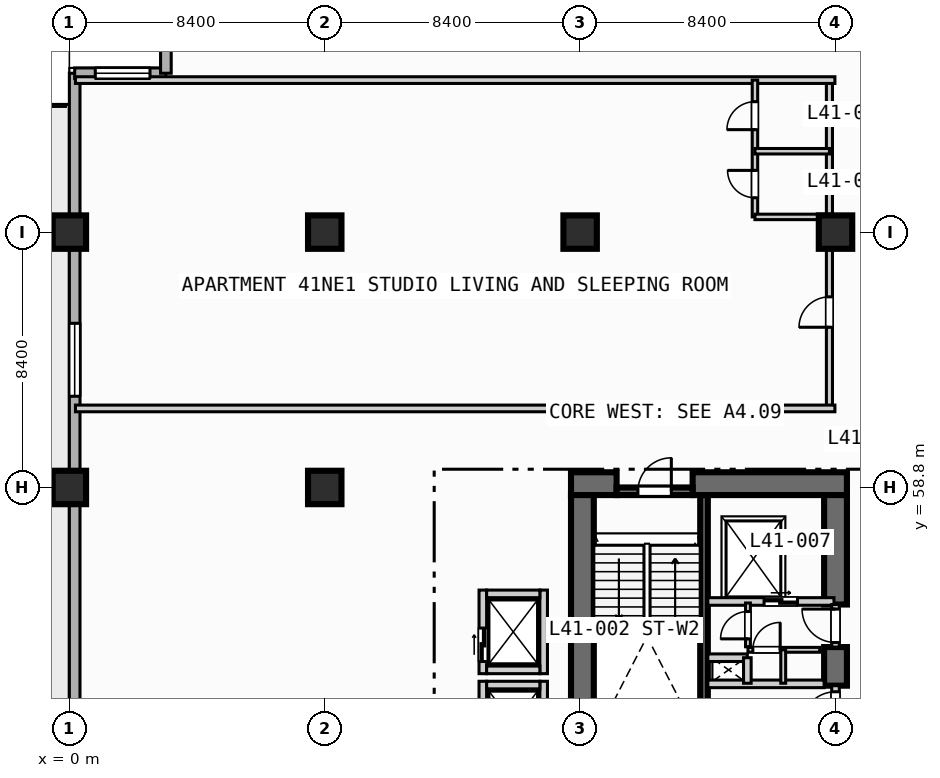
"""IFC4 building model, lengths in metres.
Left out: names, types, materials, properties, quantities, classifications, styles, units other than length and angle.
Written with IfcOpenShell. Run it as: python <this file> out.ifc"""

import sys

from ifc_helpers import new_model, si_unit, direction, frame, frame_2d, origin, origin_2d, place, context, subcontext, project, spatial, rectangle, extrude, element, fill, save


model = new_model("IFC4")
c1 = context("Model", 3, precision=1e-05, world=origin(), true_north=direction((0.0, 1.0)))
c2 = subcontext(c1, "Body", "Model", "MODEL_VIEW")
j1 = project(units=[si_unit("LENGTHUNIT", "METRE"), si_unit("PLANEANGLEUNIT", "RADIAN")], contexts=[c1])
p1 = place(None, origin())
s1 = spatial("IfcSite", under=j1, at=p1, CompositionType="ELEMENT")
p2 = place(p1, origin())
s2 = spatial("IfcBuilding", under=s1, at=p2, CompositionType="ELEMENT")
p3 = place(p2, frame((0.0, 0.0, 171.7)))
s3 = spatial("IfcBuildingStorey", under=s2, at=p3, CompositionType="ELEMENT", Elevation=171.7)
p4 = place(p3, frame((20.875, 50.5, 0.0), z_axis=(0.0, 0.0, 1.0), x_axis=(0.0, 1.0, 0.0)))
e1 = element("IfcWall", 1, at=p4, inside=s3, PredefinedType="SOLIDWALL", context=c2, shape_type="SweptSolid", body=[
    extrude(rectangle(XDim=8.05, YDim=0.25, at=frame_2d((4.025, 0.0))), origin(), (0.0, 0.0, 1.0), 3.47),
])
p5 = place(p3, frame((16.5, 58.925, 0.0), z_axis=(0.0, 0.0, 1.0), x_axis=(1.0, 0.0, 0.0)))
e2 = element("IfcWall", 2, at=p5, inside=s3, PredefinedType="SHEAR", context=c2, shape_type="SweptSolid", body=[
    extrude(rectangle(XDim=1.5, YDim=0.75, at=frame_2d((0.75, 0.0))), origin(), (0.0, 0.0, 1.0), 3.47),
])
p6 = place(p3, frame((20.5, 58.925, 0.0), z_axis=(0.0, 0.0, 1.0), x_axis=(1.0, 0.0, 0.0)))
e3 = element("IfcWall", 3, at=p6, inside=s3, PredefinedType="SHEAR", context=c2, shape_type="SweptSolid", body=[
    extrude(rectangle(XDim=5.075, YDim=0.75, at=frame_2d((2.538, 0.0))), origin(), (0.0, 0.0, 1.0), 3.47),
])
p7 = place(p3, frame((16.875, 42.2, 0.0), z_axis=(0.0, 0.0, 1.0), x_axis=(0.0, 1.0, 0.0)))
e4 = element("IfcWall", 4, at=p7, inside=s3, PredefinedType="SHEAR", context=c2, shape_type="SweptSolid", body=[
    extrude(rectangle(XDim=16.35, YDim=0.75, at=frame_2d((8.175, 0.0))), origin(), (0.0, 0.0, 1.0), 3.47),
])
p8 = place(p3, frame((25.2, 52.28, 0.0), z_axis=(0.0, 0.0, 1.0), x_axis=(0.0, 1.0, 0.0)))
e5 = element("IfcWall", 5, at=p8, inside=s3, PredefinedType="SHEAR", context=c2, shape_type="SweptSolid", body=[
    extrude(rectangle(XDim=1.27, YDim=0.75, at=frame_2d((0.635, 0.0))), origin(), (0.0, 0.0, 1.0), 3.47),
])
p9 = place(p3, frame((25.2, 54.95, 0.0), z_axis=(0.0, 0.0, 1.0), x_axis=(0.0, 1.0, 0.0)))
e6 = element("IfcWall", 6, at=p9, inside=s3, PredefinedType="SHEAR", context=c2, shape_type="SweptSolid", body=[
    extrude(rectangle(XDim=3.6, YDim=0.75, at=frame_2d((1.8, 0.0))), origin(), (0.0, 0.0, 1.0), 3.47),
])
for number, where, z_axis, x_axis in (
    (7, (0.0, 58.8, 0.0), (0.0, 0.0, 1.0), (1.0, 0.0, 0.0)),
    (8, (0.0, 67.2, 0.0), (0.0, 0.0, 1.0), (1.0, 0.0, 0.0)),
    (9, (8.4, 58.8, 0.0), (0.0, 0.0, 1.0), (1.0, 0.0, 0.0)),
    (10, (8.4, 67.2, 0.0), (0.0, 0.0, 1.0), (1.0, 0.0, 0.0)),
    (11, (16.8, 67.2, 0.0), (0.0, 0.0, 1.0), (1.0, 0.0, 0.0)),
    (12, (25.2, 67.2, 0.0), (0.0, 0.0, 1.0), (1.0, 0.0, 0.0)),
):
    element("IfcColumn", number, at=place(p3, frame(where, z_axis=z_axis, x_axis=x_axis)), inside=s3, PredefinedType="COLUMN", context=c2, shape_type="SweptSolid", body=[
        extrude(rectangle(XDim=1.1, YDim=1.1, at=origin_2d()), origin(), (0.0, 0.0, 1.0), 3.7),
    ])
p10 = place(p3, frame((0.175, 3.175, 0.0), z_axis=(0.0, 0.0, 1.0), x_axis=(0.0, 1.0, 0.0)))
e13 = element("IfcWall", 13, at=p10, inside=s3, PredefinedType="STANDARD", context=c2, shape_type="SweptSolid", body=[
    extrude(rectangle(XDim=69.25, YDim=0.35, at=frame_2d((34.625, 0.0))), origin(), (0.0, 0.0, 1.0), 3.47),
])
p11 = place(p10, frame((42.325, 0.0, 0.0)))
e14 = element("IfcOpeningElement", 14, at=p11, cuts=e13, PredefinedType="OPENING", context=c2, shape_type="SweptSolid", body=[
    extrude(rectangle(XDim=1.4, YDim=2.2, at=frame_2d((0.7, 1.1))), frame((0.0, 0.185, 0.0), z_axis=(0.0, -1.0, 0.0), x_axis=(1.0, 0.0, 0.0)), (0.0, 0.0, 1.0), 0.37),
])
p12 = place(p10, frame((25.025, 0.0, 0.85)))
e15 = element("IfcOpeningElement", 15, at=p12, cuts=e13, PredefinedType="OPENING", context=c2, shape_type="SweptSolid", body=[
    extrude(rectangle(XDim=2.4, YDim=1.95, at=frame_2d((1.2, 0.975))), frame((0.0, 0.185, 0.0), z_axis=(0.0, -1.0, 0.0), x_axis=(1.0, 0.0, 0.0)), (0.0, 0.0, 1.0), 0.37),
])
p13 = place(p10, frame((33.725, 0.0, 0.85)))
e16 = element("IfcOpeningElement", 16, at=p13, cuts=e13, PredefinedType="OPENING", context=c2, shape_type="SweptSolid", body=[
    extrude(rectangle(XDim=1.8, YDim=1.8, at=frame_2d((0.9, 0.9))), frame((0.0, 0.185, 0.0), z_axis=(0.0, -1.0, 0.0), x_axis=(1.0, 0.0, 0.0)), (0.0, 0.0, 1.0), 0.37),
])
p14 = place(p10, frame((58.625, 0.0, 0.85)))
e17 = element("IfcOpeningElement", 17, at=p14, cuts=e13, PredefinedType="OPENING", context=c2, shape_type="SweptSolid", body=[
    extrude(rectangle(XDim=2.4, YDim=1.95, at=frame_2d((1.2, 0.975))), frame((0.0, 0.185, 0.0), z_axis=(0.0, -1.0, 0.0), x_axis=(1.0, 0.0, 0.0)), (0.0, 0.0, 1.0), 0.37),
])
p15 = place(p3, frame((0.175, 72.425, 0.0), z_axis=(0.0, 0.0, 1.0), x_axis=(1.0, 0.0, 0.0)))
e18 = element("IfcWall", 18, at=p15, inside=s3, PredefinedType="STANDARD", context=c2, shape_type="SweptSolid", body=[
    extrude(rectangle(XDim=3.0, YDim=0.35, at=frame_2d((1.5, 0.0))), origin(), (0.0, 0.0, 1.0), 3.47),
])
p16 = place(p15, frame((0.677, 0.0, 0.85)))
e19 = element("IfcOpeningElement", 19, at=p16, cuts=e18, PredefinedType="OPENING", context=c2, shape_type="SweptSolid", body=[
    extrude(rectangle(XDim=1.8, YDim=1.8, at=frame_2d((0.9, 0.9))), frame((0.0, 0.185, 0.0), z_axis=(0.0, -1.0, 0.0), x_axis=(1.0, 0.0, 0.0)), (0.0, 0.0, 1.0), 0.37),
])
p17 = place(p3, frame((3.175, 72.425, 0.0), z_axis=(0.0, 0.0, 1.0), x_axis=(0.0, 1.0, 0.0)))
e20 = element("IfcWall", 20, at=p17, inside=s3, PredefinedType="STANDARD", context=c2, shape_type="SweptSolid", body=[
    extrude(rectangle(XDim=3.0, YDim=0.35, at=frame_2d((1.5, 0.0))), origin(), (0.0, 0.0, 1.0), 3.47),
])
p18 = place(p3, frame((18.0, 58.675, 0.0), z_axis=(0.0, 0.0, 1.0), x_axis=(1.0, 0.0, 0.0)))
e21 = element("IfcWall", 21, at=p18, inside=s3, PredefinedType="SOLIDWALL", context=c2, shape_type="SweptSolid", body=[
    extrude(rectangle(XDim=2.5, YDim=0.25, at=frame_2d((1.25, 0.0))), origin(), (0.0, 0.0, 1.0), 3.47),
])
p19 = place(p18, frame((0.7, 0.0, 0.0)))
e22 = element("IfcOpeningElement", 22, at=p19, cuts=e21, PredefinedType="OPENING", context=c2, shape_type="SweptSolid", body=[
    extrude(rectangle(XDim=1.1, YDim=2.15, at=frame_2d((0.55, 1.075))), frame((0.0, 0.135, 0.0), z_axis=(0.0, -1.0, 0.0), x_axis=(1.0, 0.0, 0.0)), (0.0, 0.0, 1.0), 0.27),
])
p20 = place(p3, frame((25.2, 50.8, 0.0), z_axis=(0.0, 0.0, 1.0), x_axis=(0.0, 1.0, 0.0)))
e23 = element("IfcWall", 23, at=p20, inside=s3, PredefinedType="SOLIDWALL", context=c2, shape_type="SweptSolid", body=[
    extrude(rectangle(XDim=1.48, YDim=0.25, at=frame_2d((0.74, 0.0))), origin(), (0.0, 0.0, 1.0), 3.47),
])
p21 = place(p20, frame((0.18, 0.0, 0.0)))
e24 = element("IfcOpeningElement", 24, at=p21, cuts=e23, PredefinedType="OPENING", context=c2, shape_type="SweptSolid", body=[
    extrude(rectangle(XDim=1.1, YDim=2.15, at=frame_2d((0.55, 1.075))), frame((0.0, 0.135, 0.0), z_axis=(0.0, -1.0, 0.0), x_axis=(1.0, 0.0, 0.0)), (0.0, 0.0, 1.0), 0.27),
])
p22 = place(p3, frame((21.0, 52.34, 0.0), z_axis=(0.0, 0.0, 1.0), x_axis=(1.0, 0.0, 0.0)))
e25 = element("IfcWall", 25, at=p22, inside=s3, PredefinedType="SOLIDWALL", context=c2, shape_type="SweptSolid", body=[
    extrude(rectangle(XDim=3.825, YDim=0.25, at=frame_2d((1.913, 0.0))), origin(), (0.0, 0.0, 1.0), 3.47),
])
p23 = place(p3, frame((21.0, 55.05, 0.0), z_axis=(0.0, 0.0, 1.0), x_axis=(1.0, 0.0, 0.0)))
e26 = element("IfcWall", 26, at=p23, inside=s3, PredefinedType="SOLIDWALL", context=c2, shape_type="SweptSolid", body=[
    extrude(rectangle(XDim=4.15, YDim=0.25, at=frame_2d((2.075, 0.0))), origin(), (0.0, 0.0, 1.0), 3.47),
])
p24 = place(p23, frame((1.85, 0.0, 0.0)))
e27 = element("IfcOpeningElement", 27, at=p24, cuts=e26, PredefinedType="OPENING", context=c2, shape_type="SweptSolid", body=[
    extrude(rectangle(XDim=1.1, YDim=2.15, at=frame_2d((0.55, 1.075))), frame((0.0, 0.135, 0.0), z_axis=(0.0, -1.0, 0.0), x_axis=(1.0, 0.0, 0.0)), (0.0, 0.0, 1.0), 0.27),
])
p25 = place(p3, frame((25.2, 53.55, 0.0), z_axis=(0.0, 0.0, 1.0), x_axis=(0.0, 1.0, 0.0)))
e28 = element("IfcWall", 28, at=p25, inside=s3, PredefinedType="SOLIDWALL", context=c2, shape_type="SweptSolid", body=[
    extrude(rectangle(XDim=1.4, YDim=0.25, at=frame_2d((0.7, 0.0))), origin(), (0.0, 0.0, 1.0), 3.47),
])
p26 = place(p25, frame((0.15, 0.0, 0.0)))
e29 = element("IfcOpeningElement", 29, at=p26, cuts=e28, PredefinedType="OPENING", context=c2, shape_type="SweptSolid", body=[
    extrude(rectangle(XDim=1.1, YDim=2.15, at=frame_2d((0.55, 1.075))), frame((0.0, 0.135, 0.0), z_axis=(0.0, -1.0, 0.0), x_axis=(1.0, 0.0, 0.0)), (0.0, 0.0, 1.0), 0.27),
])
p27 = place(p3, frame((21.0, 53.2, 0.0), z_axis=(0.0, 0.0, 1.0), x_axis=(1.0, 0.0, 0.0)))
e30 = element("IfcWall", 30, at=p27, inside=s3, PredefinedType="SOLIDWALL", context=c2, shape_type="SweptSolid", body=[
    extrude(rectangle(XDim=1.3, YDim=0.25, at=frame_2d((0.65, 0.0))), origin(), (0.0, 0.0, 1.0), 3.47),
])
p28 = place(p3, frame((22.3, 52.36, 0.0), z_axis=(0.0, 0.0, 1.0), x_axis=(0.0, 1.0, 0.0)))
e31 = element("IfcWall", 31, at=p28, inside=s3, PredefinedType="SOLIDWALL", context=c2, shape_type="SweptSolid", body=[
    extrude(rectangle(XDim=0.84, YDim=0.25, at=frame_2d((0.42, 0.0))), origin(), (0.0, 0.0, 1.0), 3.47),
])
p29 = place(p3, frame((22.32, 53.56, 0.0), z_axis=(0.0, 0.0, 1.0), x_axis=(0.0, 1.0, 0.0)))
e32 = element("IfcWall", 32, at=p29, inside=s3, PredefinedType="PARTITIONING", context=c2, shape_type="SweptSolid", body=[
    extrude(rectangle(XDim=1.44, YDim=0.16, at=frame_2d((0.72, 0.0))), origin(), (0.0, 0.0, 1.0), 3.47),
])
p30 = place(p29, frame((0.26, 0.0, 0.0)))
e33 = element("IfcOpeningElement", 33, at=p30, cuts=e32, PredefinedType="OPENING", context=c2, shape_type="SweptSolid", body=[
    extrude(rectangle(XDim=0.9, YDim=2.1, at=frame_2d((0.45, 1.05))), frame((0.0, 0.09, 0.0), z_axis=(0.0, -1.0, 0.0), x_axis=(1.0, 0.0, 0.0)), (0.0, 0.0, 1.0), 0.18),
])
p31 = place(p3, frame((22.32, 53.46, 0.0), z_axis=(0.0, 0.0, 1.0), x_axis=(1.0, 0.0, 0.0)))
e34 = element("IfcWall", 34, at=p31, inside=s3, PredefinedType="PARTITIONING", context=c2, shape_type="SweptSolid", body=[
    extrude(rectangle(XDim=2.36, YDim=0.16, at=frame_2d((1.18, 0.0))), origin(), (0.0, 0.0, 1.0), 3.47),
])
p32 = place(p31, frame((0.16, 0.0, 0.0)))
e35 = element("IfcOpeningElement", 35, at=p32, cuts=e34, PredefinedType="OPENING", context=c2, shape_type="SweptSolid", body=[
    extrude(rectangle(XDim=0.9, YDim=2.1, at=frame_2d((0.45, 1.05))), frame((0.0, 0.09, 0.0), z_axis=(0.0, -1.0, 0.0), x_axis=(1.0, 0.0, 0.0)), (0.0, 0.0, 1.0), 0.18),
])
p33 = place(p3, frame((23.48, 52.36, 0.0), z_axis=(0.0, 0.0, 1.0), x_axis=(0.0, 1.0, 0.0)))
e36 = element("IfcWall", 36, at=p33, inside=s3, PredefinedType="PARTITIONING", context=c2, shape_type="SweptSolid", body=[
    extrude(rectangle(XDim=1.1, YDim=0.16, at=frame_2d((0.55, 0.0))), origin(), (0.0, 0.0, 1.0), 3.47),
])
p34 = place(p3, frame((13.6, 49.675, 0.0), z_axis=(0.0, 0.0, 1.0), x_axis=(0.0, 1.0, 0.0)))
e37 = element("IfcWall", 37, at=p34, inside=s3, PredefinedType="SOLIDWALL", context=c2, shape_type="SweptSolid", body=[
    extrude(rectangle(XDim=2.75, YDim=0.25, at=frame_2d((1.375, 0.0))), origin(), (0.0, 0.0, 1.0), 3.47),
])
p35 = place(p34, frame((0.4, 0.0, 0.0)))
e38 = element("IfcOpeningElement", 38, at=p35, cuts=e37, PredefinedType="OPENING", context=c2, shape_type="SweptSolid", body=[
    extrude(rectangle(XDim=1.1, YDim=2.15, at=frame_2d((0.55, 1.075))), frame((0.0, 0.135, 0.0), z_axis=(0.0, -1.0, 0.0), x_axis=(1.0, 0.0, 0.0)), (0.0, 0.0, 1.0), 0.27),
])
p36 = place(p3, frame((15.6, 49.675, 0.0), z_axis=(0.0, 0.0, 1.0), x_axis=(0.0, 1.0, 0.0)))
e39 = element("IfcWall", 39, at=p36, inside=s3, PredefinedType="SOLIDWALL", context=c2, shape_type="SweptSolid", body=[
    extrude(rectangle(XDim=2.75, YDim=0.25, at=frame_2d((1.375, 0.0))), origin(), (0.0, 0.0, 1.0), 3.47),
])
p37 = place(p3, frame((13.725, 52.3, 0.0), z_axis=(0.0, 0.0, 1.0), x_axis=(1.0, 0.0, 0.0)))
e40 = element("IfcWall", 40, at=p37, inside=s3, PredefinedType="SOLIDWALL", context=c2, shape_type="SweptSolid", body=[
    extrude(rectangle(XDim=1.75, YDim=0.25, at=frame_2d((0.875, 0.0))), origin(), (0.0, 0.0, 1.0), 3.47),
])
p38 = place(p3, frame((13.6, 52.675, 0.0), z_axis=(0.0, 0.0, 1.0), x_axis=(0.0, 1.0, 0.0)))
e41 = element("IfcWall", 41, at=p38, inside=s3, PredefinedType="SOLIDWALL", context=c2, shape_type="SweptSolid", body=[
    extrude(rectangle(XDim=2.75, YDim=0.25, at=frame_2d((1.375, 0.0))), origin(), (0.0, 0.0, 1.0), 3.47),
])
p39 = place(p38, frame((0.4, 0.0, 0.0)))
e42 = element("IfcOpeningElement", 42, at=p39, cuts=e41, PredefinedType="OPENING", context=c2, shape_type="SweptSolid", body=[
    extrude(rectangle(XDim=1.1, YDim=2.15, at=frame_2d((0.55, 1.075))), frame((0.0, 0.135, 0.0), z_axis=(0.0, -1.0, 0.0), x_axis=(1.0, 0.0, 0.0)), (0.0, 0.0, 1.0), 0.27),
])
p40 = place(p3, frame((15.6, 52.675, 0.0), z_axis=(0.0, 0.0, 1.0), x_axis=(0.0, 1.0, 0.0)))
e43 = element("IfcWall", 43, at=p40, inside=s3, PredefinedType="SOLIDWALL", context=c2, shape_type="SweptSolid", body=[
    extrude(rectangle(XDim=2.75, YDim=0.25, at=frame_2d((1.375, 0.0))), origin(), (0.0, 0.0, 1.0), 3.47),
])
for number, where, z_axis, x_axis in (
    (44, (13.725, 52.8, 0.0), (0.0, 0.0, 1.0), (1.0, 0.0, 0.0)),
    (45, (13.725, 55.3, 0.0), (0.0, 0.0, 1.0), (1.0, 0.0, 0.0)),
):
    element("IfcWall", number, at=place(p3, frame(where, z_axis=z_axis, x_axis=x_axis)), inside=s3, PredefinedType="SOLIDWALL", context=c2, shape_type="SweptSolid", body=[
        extrude(rectangle(XDim=1.75, YDim=0.25, at=frame_2d((0.875, 0.0))), origin(), (0.0, 0.0, 1.0), 3.47),
    ])
p41 = place(p3, frame((25.0, 61.4, 0.0), z_axis=(0.0, 0.0, 1.0), x_axis=(0.0, 1.0, 0.0)))
e46 = element("IfcWall", 46, at=p41, inside=s3, PredefinedType="PARTITIONING", context=c2, shape_type="SweptSolid", body=[
    extrude(rectangle(XDim=10.8, YDim=0.2, at=frame_2d((5.4, 0.0))), origin(), (0.0, 0.0, 1.0), 2.82),
])
p42 = place(p41, frame((2.67, 0.0, 0.0)))
e47 = element("IfcOpeningElement", 47, at=p42, cuts=e46, PredefinedType="OPENING", context=c2, shape_type="SweptSolid", body=[
    extrude(rectangle(XDim=1.0, YDim=2.15, at=frame_2d((0.5, 1.075))), frame((0.0, 0.11, 0.0), z_axis=(0.0, -1.0, 0.0), x_axis=(1.0, 0.0, 0.0)), (0.0, 0.0, 1.0), 0.22),
])
for number, where, z_axis, x_axis in (
    (48, (0.2, 61.4, 0.0), (0.0, 0.0, 1.0), (1.0, 0.0, 0.0)),
    (49, (0.2, 72.2, 0.0), (0.0, 0.0, 1.0), (1.0, 0.0, 0.0)),
):
    element("IfcWall", number, at=place(p3, frame(where, z_axis=z_axis, x_axis=x_axis)), inside=s3, PredefinedType="PARTITIONING", context=c2, shape_type="SweptSolid", body=[
        extrude(rectangle(XDim=24.98, YDim=0.22, at=frame_2d((12.49, 0.0))), origin(), (0.0, 0.0, 1.0), 3.47),
    ])
p43 = place(p3, frame((22.55, 67.7, 0.0), z_axis=(0.0, 0.0, 1.0), x_axis=(0.0, 1.0, 0.0)))
e50 = element("IfcWall", 50, at=p43, inside=s3, PredefinedType="PLUMBINGWALL", context=c2, shape_type="SweptSolid", body=[
    extrude(rectangle(XDim=4.5, YDim=0.18, at=frame_2d((2.25, 0.0))), origin(), (0.0, 0.0, 1.0), 3.47),
])
p44 = place(p43, frame((0.63, 0.0, 0.0)))
e51 = element("IfcOpeningElement", 51, at=p44, cuts=e50, PredefinedType="OPENING", context=c2, shape_type="SweptSolid", body=[
    extrude(rectangle(XDim=0.9, YDim=2.1, at=frame_2d((0.45, 1.05))), frame((0.0, 0.1, 0.0), z_axis=(0.0, -1.0, 0.0), x_axis=(1.0, 0.0, 0.0)), (0.0, 0.0, 1.0), 0.2),
])
p45 = place(p43, frame((2.87, 0.0, 0.0)))
e52 = element("IfcOpeningElement", 52, at=p45, cuts=e50, PredefinedType="OPENING", context=c2, shape_type="SweptSolid", body=[
    extrude(rectangle(XDim=0.92, YDim=2.1, at=frame_2d((0.46, 1.05))), frame((0.0, 0.1, 0.0), z_axis=(0.0, -1.0, 0.0), x_axis=(1.0, 0.0, 0.0)), (0.0, 0.0, 1.0), 0.2),
])
for number, where, z_axis, x_axis in (
    (53, (22.55, 67.7, 0.0), (0.0, 0.0, 1.0), (1.0, 0.0, 0.0)),
    (54, (22.55, 69.86, 0.0), (0.0, 0.0, 1.0), (1.0, 0.0, 0.0)),
):
    element("IfcWall", number, at=place(p3, frame(where, z_axis=z_axis, x_axis=x_axis)), inside=s3, PredefinedType="PLUMBINGWALL", context=c2, shape_type="SweptSolid", body=[
        extrude(rectangle(XDim=2.45, YDim=0.18, at=frame_2d((1.225, 0.0))), origin(), (0.0, 0.0, 1.0), 3.47),
    ])
p46 = place(p14, origin())
e55 = element("IfcWindow", 55, at=p46, inside=s3, PartitioningType="SINGLE_PANEL", PredefinedType="WINDOW", context=c2, shape_type="SweptSolid", body=[
    extrude(rectangle(XDim=2.4, YDim=1.95, at=frame_2d((1.2, 0.975))), frame((0.0, 0.03, 0.0), z_axis=(0.0, -1.0, 0.0), x_axis=(1.0, 0.0, 0.0)), (0.0, 0.0, 1.0), 0.06),
])
fill(e17, e55)
p47 = place(p16, origin())
e56 = element("IfcWindow", 56, at=p47, inside=s3, PartitioningType="SINGLE_PANEL", PredefinedType="WINDOW", context=c2, shape_type="SweptSolid", body=[
    extrude(rectangle(XDim=1.8, YDim=1.8, at=frame_2d((0.9, 0.9))), frame((0.0, 0.03, 0.0), z_axis=(0.0, -1.0, 0.0), x_axis=(1.0, 0.0, 0.0)), (0.0, 0.0, 1.0), 0.06),
])
fill(e19, e56)
p48 = place(p19, origin())
e57 = element("IfcDoor", 57, at=p48, inside=s3, OperationType="SINGLE_SWING_RIGHT", PredefinedType="DOOR", context=c2, shape_type="SweptSolid", body=[
    extrude(rectangle(XDim=1.1, YDim=2.15, at=frame_2d((0.55, 1.075))), frame((0.0, 0.025, 0.0), z_axis=(0.0, -1.0, 0.0), x_axis=(1.0, 0.0, 0.0)), (0.0, 0.0, 1.0), 0.05),
])
fill(e22, e57)
p49 = place(p21, origin())
e58 = element("IfcDoor", 58, at=p49, inside=s3, OperationType="SINGLE_SWING_LEFT", PredefinedType="DOOR", context=c2, shape_type="SweptSolid", body=[
    extrude(rectangle(XDim=1.1, YDim=2.15, at=frame_2d((0.55, 1.075))), frame((0.0, 0.025, 0.0), z_axis=(0.0, -1.0, 0.0), x_axis=(1.0, 0.0, 0.0)), (0.0, 0.0, 1.0), 0.05),
])
fill(e24, e58)
p50 = place(p24, origin())
e59 = element("IfcDoor", 59, at=p50, inside=s3, OperationType="SLIDING_TO_LEFT", PredefinedType="DOOR", context=c2, shape_type="SweptSolid", body=[
    extrude(rectangle(XDim=1.1, YDim=2.15, at=frame_2d((0.55, 1.075))), frame((0.0, 0.025, 0.0), z_axis=(0.0, -1.0, 0.0), x_axis=(1.0, 0.0, 0.0)), (0.0, 0.0, 1.0), 0.05),
])
fill(e27, e59)
p51 = place(p26, origin())
e60 = element("IfcDoor", 60, at=p51, inside=s3, OperationType="SINGLE_SWING_RIGHT", PredefinedType="DOOR", context=c2, shape_type="SweptSolid", body=[
    extrude(rectangle(XDim=1.1, YDim=2.15, at=frame_2d((0.55, 1.075))), frame((0.0, 0.025, 0.0), z_axis=(0.0, -1.0, 0.0), x_axis=(1.0, 0.0, 0.0)), (0.0, 0.0, 1.0), 0.05),
])
fill(e29, e60)
p52 = place(p30, origin())
e61 = element("IfcDoor", 61, at=p52, inside=s3, OperationType="SINGLE_SWING_LEFT", PredefinedType="DOOR", context=c2, shape_type="SweptSolid", body=[
    extrude(rectangle(XDim=0.9, YDim=2.1, at=frame_2d((0.45, 1.05))), frame((0.0, 0.025, 0.0), z_axis=(0.0, -1.0, 0.0), x_axis=(1.0, 0.0, 0.0)), (0.0, 0.0, 1.0), 0.05),
])
fill(e33, e61)
p53 = place(p32, origin())
e62 = element("IfcDoor", 62, at=p53, inside=s3, OperationType="SINGLE_SWING_RIGHT", PredefinedType="DOOR", context=c2, shape_type="SweptSolid", body=[
    extrude(rectangle(XDim=0.9, YDim=2.1, at=frame_2d((0.45, 1.05))), frame((0.0, 0.025, 0.0), z_axis=(0.0, -1.0, 0.0), x_axis=(1.0, 0.0, 0.0)), (0.0, 0.0, 1.0), 0.05),
])
fill(e35, e62)
p54 = place(p39, origin())
e63 = element("IfcDoor", 63, at=p54, inside=s3, OperationType="SLIDING_TO_LEFT", PredefinedType="DOOR", context=c2, shape_type="SweptSolid", body=[
    extrude(rectangle(XDim=1.1, YDim=2.15, at=frame_2d((0.55, 1.075))), frame((0.0, 0.025, 0.0), z_axis=(0.0, -1.0, 0.0), x_axis=(1.0, 0.0, 0.0)), (0.0, 0.0, 1.0), 0.05),
])
fill(e42, e63)
p55 = place(p42, origin())
e64 = element("IfcDoor", 64, at=p55, inside=s3, OperationType="SINGLE_SWING_LEFT", PredefinedType="DOOR", context=c2, shape_type="SweptSolid", body=[
    extrude(rectangle(XDim=1.0, YDim=2.15, at=frame_2d((0.5, 1.075))), frame((0.0, 0.025, 0.0), z_axis=(0.0, -1.0, 0.0), x_axis=(1.0, 0.0, 0.0)), (0.0, 0.0, 1.0), 0.05),
])
fill(e47, e64)
p56 = place(p44, origin())
e65 = element("IfcDoor", 65, at=p56, inside=s3, OperationType="SINGLE_SWING_RIGHT", PredefinedType="DOOR", context=c2, shape_type="SweptSolid", body=[
    extrude(rectangle(XDim=0.9, YDim=2.1, at=frame_2d((0.45, 1.05))), frame((0.0, 0.025, 0.0), z_axis=(0.0, -1.0, 0.0), x_axis=(1.0, 0.0, 0.0)), (0.0, 0.0, 1.0), 0.05),
])
fill(e51, e65)
p57 = place(p45, origin())
e66 = element("IfcDoor", 66, at=p57, inside=s3, OperationType="SINGLE_SWING_LEFT", PredefinedType="DOOR", context=c2, shape_type="SweptSolid", body=[
    extrude(rectangle(XDim=0.92, YDim=2.1, at=frame_2d((0.46, 1.05))), frame((0.0, 0.025, 0.0), z_axis=(0.0, -1.0, 0.0), x_axis=(1.0, 0.0, 0.0)), (0.0, 0.0, 1.0), 0.05),
])
fill(e52, e66)
save(model, sys.argv[1])
